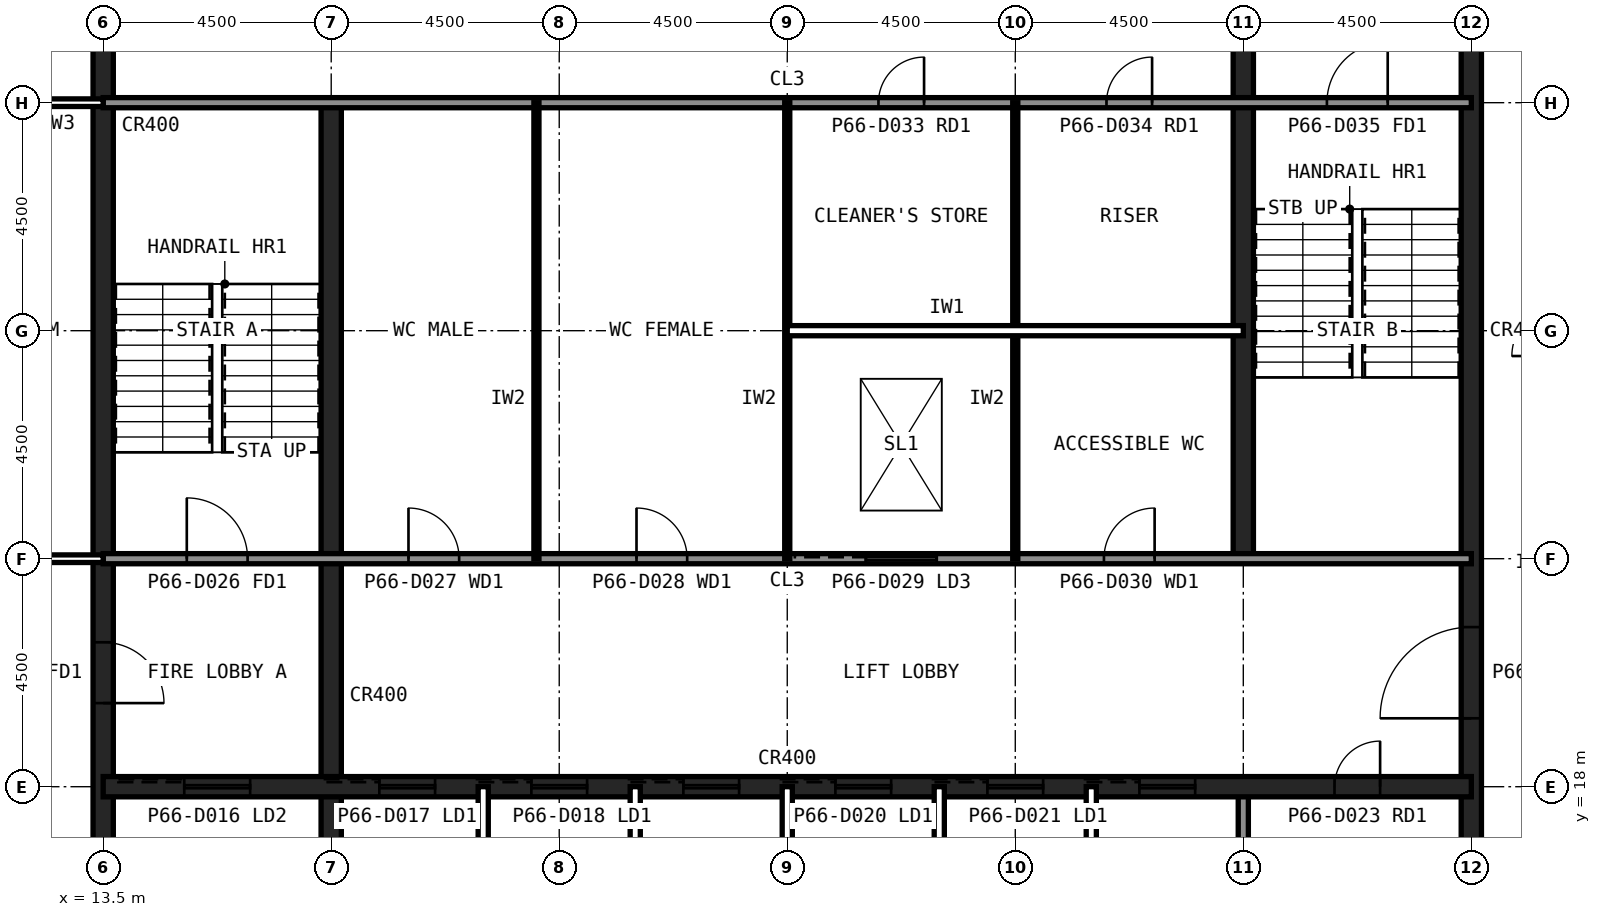
"""IFC4 building model, lengths in metres.
Left out: names, types, materials, properties, quantities, classifications, styles, units other than length and angle.
Written with IfcOpenShell. Run it as: python <this file> out.ifc"""

import sys

from ifc_helpers import new_model, si_unit, direction, frame, frame_2d, origin, place, context, subcontext, project, spatial, rectangle, extrude, element, fill, save


model = new_model("IFC4")
c1 = context("Model", 3, precision=1e-05, world=origin(), true_north=direction((0.0, 1.0)))
c2 = subcontext(c1, "Body", "Model", "MODEL_VIEW")
j1 = project(units=[si_unit("LENGTHUNIT", "METRE"), si_unit("PLANEANGLEUNIT", "RADIAN")], contexts=[c1])
p1 = place(None, origin())
s1 = spatial("IfcSite", under=j1, at=p1, CompositionType="ELEMENT")
p2 = place(p1, origin())
s2 = spatial("IfcBuilding", under=s1, at=p2, CompositionType="ELEMENT")
p3 = place(p2, frame((0.0, 0.0, 278.6)))
s3 = spatial("IfcBuildingStorey", under=s2, at=p3, CompositionType="ELEMENT", Elevation=278.6)
p4 = place(p3, frame((40.5, 13.5, 0.0), z_axis=(0.0, 0.0, 1.0), x_axis=(0.0, 1.0, 0.0)))
e1 = element("IfcWall", 1, at=p4, inside=s3, PredefinedType="SHEAR", context=c2, shape_type="SweptSolid", body=[
    extrude(rectangle(XDim=27.0, YDim=0.4, at=frame_2d((13.5, 0.0))), origin(), (0.0, 0.0, 1.0), 4.0),
])
p5 = place(p4, frame((5.85, 0.0, 0.0)))
e2 = element("IfcOpeningElement", 2, at=p5, cuts=e1, PredefinedType="OPENING", context=c2, shape_type="SweptSolid", body=[
    extrude(rectangle(XDim=1.8, YDim=2.1, at=frame_2d((0.9, 1.05))), frame((0.0, 0.21, 0.0), z_axis=(0.0, -1.0, 0.0), x_axis=(1.0, 0.0, 0.0)), (0.0, 0.0, 1.0), 0.42),
])
p6 = place(p4, frame((19.65, 0.0, 0.0)))
e3 = element("IfcOpeningElement", 3, at=p6, cuts=e1, PredefinedType="OPENING", context=c2, shape_type="SweptSolid", body=[
    extrude(rectangle(XDim=1.2, YDim=2.1, at=frame_2d((0.6, 1.05))), frame((0.0, 0.21, 0.0), z_axis=(0.0, -1.0, 0.0), x_axis=(1.0, 0.0, 0.0)), (0.0, 0.0, 1.0), 0.42),
])
p7 = place(p3, frame((13.5, 40.5, 0.0), z_axis=(0.0, 0.0, 1.0), x_axis=(0.0, -1.0, 0.0)))
e4 = element("IfcWall", 4, at=p7, inside=s3, PredefinedType="SHEAR", context=c2, shape_type="SweptSolid", body=[
    extrude(rectangle(XDim=27.0, YDim=0.4, at=frame_2d((13.5, 0.0))), origin(), (0.0, 0.0, 1.0), 4.0),
])
p8 = place(p7, frame((19.65, 0.0, 0.0)))
e5 = element("IfcOpeningElement", 5, at=p8, cuts=e4, PredefinedType="OPENING", context=c2, shape_type="SweptSolid", body=[
    extrude(rectangle(XDim=1.2, YDim=2.1, at=frame_2d((0.6, 1.05))), frame((0.0, 0.21, 0.0), z_axis=(0.0, -1.0, 0.0), x_axis=(1.0, 0.0, 0.0)), (0.0, 0.0, 1.0), 0.42),
])
p9 = place(p7, frame((5.85, 0.0, 0.0)))
e6 = element("IfcOpeningElement", 6, at=p9, cuts=e4, PredefinedType="OPENING", context=c2, shape_type="SweptSolid", body=[
    extrude(rectangle(XDim=1.8, YDim=2.1, at=frame_2d((0.9, 1.05))), frame((0.0, 0.21, 0.0), z_axis=(0.0, -1.0, 0.0), x_axis=(1.0, 0.0, 0.0)), (0.0, 0.0, 1.0), 0.42),
])
p10 = place(p3, frame((18.0, 13.5, 0.0), z_axis=(0.0, 0.0, 1.0), x_axis=(0.0, 1.0, 0.0)))
e7 = element("IfcWall", 7, at=p10, inside=s3, PredefinedType="SHEAR", context=c2, shape_type="SweptSolid", body=[
    extrude(rectangle(XDim=18.0, YDim=0.4, at=frame_2d((9.0, 0.0))), origin(), (0.0, 0.0, 1.0), 4.0),
])
p11 = place(p3, frame((36.0, 13.5, 0.0), z_axis=(0.0, 0.0, 1.0), x_axis=(0.0, 1.0, 0.0)))
e8 = element("IfcWall", 8, at=p11, inside=s3, PredefinedType="SOLIDWALL", context=c2, shape_type="SweptSolid", body=[
    extrude(rectangle(XDim=4.5, YDim=0.2, at=frame_2d((2.25, 0.0))), origin(), (0.0, 0.0, 1.0), 3.84),
])
p12 = place(p3, frame((36.0, 22.5, 0.0), z_axis=(0.0, 0.0, 1.0), x_axis=(0.0, 1.0, 0.0)))
e9 = element("IfcWall", 9, at=p12, inside=s3, PredefinedType="SHEAR", context=c2, shape_type="SweptSolid", body=[
    extrude(rectangle(XDim=18.0, YDim=0.4, at=frame_2d((9.0, 0.0))), origin(), (0.0, 0.0, 1.0), 4.0),
])
p13 = place(p3, frame((13.5, 18.0, 0.0), z_axis=(0.0, 0.0, 1.0), x_axis=(1.0, 0.0, 0.0)))
e10 = element("IfcWall", 10, at=p13, inside=s3, PredefinedType="SHEAR", context=c2, shape_type="SweptSolid", body=[
    extrude(rectangle(XDim=27.0, YDim=0.4, at=frame_2d((13.5, 0.0))), origin(), (0.0, 0.0, 1.0), 4.0),
])
p14 = place(p13, frame((24.3, 0.0, 0.0)))
e11 = element("IfcOpeningElement", 11, at=p14, cuts=e10, PredefinedType="OPENING", context=c2, shape_type="SweptSolid", body=[
    extrude(rectangle(XDim=0.9, YDim=2.1, at=frame_2d((0.45, 1.05))), frame((0.0, 0.21, 0.0), z_axis=(0.0, -1.0, 0.0), x_axis=(1.0, 0.0, 0.0)), (0.0, 0.0, 1.0), 0.42),
])
p15 = place(p13, frame((5.45, 0.0, 0.0)))
e12 = element("IfcOpeningElement", 12, at=p15, cuts=e10, PredefinedType="OPENING", context=c2, shape_type="SweptSolid", body=[
    extrude(rectangle(XDim=1.1, YDim=2.1, at=frame_2d((0.55, 1.05))), frame((0.0, 0.21, 0.0), z_axis=(0.0, -1.0, 0.0), x_axis=(1.0, 0.0, 0.0)), (0.0, 0.0, 1.0), 0.42),
])
p16 = place(p13, frame((8.45, 0.0, 0.0)))
e13 = element("IfcOpeningElement", 13, at=p16, cuts=e10, PredefinedType="OPENING", context=c2, shape_type="SweptSolid", body=[
    extrude(rectangle(XDim=1.1, YDim=2.1, at=frame_2d((0.55, 1.05))), frame((0.0, 0.21, 0.0), z_axis=(0.0, -1.0, 0.0), x_axis=(1.0, 0.0, 0.0)), (0.0, 0.0, 1.0), 0.42),
])
p17 = place(p13, frame((11.45, 0.0, 0.0)))
e14 = element("IfcOpeningElement", 14, at=p17, cuts=e10, PredefinedType="OPENING", context=c2, shape_type="SweptSolid", body=[
    extrude(rectangle(XDim=1.1, YDim=2.1, at=frame_2d((0.55, 1.05))), frame((0.0, 0.21, 0.0), z_axis=(0.0, -1.0, 0.0), x_axis=(1.0, 0.0, 0.0)), (0.0, 0.0, 1.0), 0.42),
])
p18 = place(p13, frame((14.45, 0.0, 0.0)))
e15 = element("IfcOpeningElement", 15, at=p18, cuts=e10, PredefinedType="OPENING", context=c2, shape_type="SweptSolid", body=[
    extrude(rectangle(XDim=1.1, YDim=2.1, at=frame_2d((0.55, 1.05))), frame((0.0, 0.21, 0.0), z_axis=(0.0, -1.0, 0.0), x_axis=(1.0, 0.0, 0.0)), (0.0, 0.0, 1.0), 0.42),
])
p19 = place(p13, frame((17.45, 0.0, 0.0)))
e16 = element("IfcOpeningElement", 16, at=p19, cuts=e10, PredefinedType="OPENING", context=c2, shape_type="SweptSolid", body=[
    extrude(rectangle(XDim=1.1, YDim=2.1, at=frame_2d((0.55, 1.05))), frame((0.0, 0.21, 0.0), z_axis=(0.0, -1.0, 0.0), x_axis=(1.0, 0.0, 0.0)), (0.0, 0.0, 1.0), 0.42),
])
p20 = place(p13, frame((20.45, 0.0, 0.0)))
e17 = element("IfcOpeningElement", 17, at=p20, cuts=e10, PredefinedType="OPENING", context=c2, shape_type="SweptSolid", body=[
    extrude(rectangle(XDim=1.1, YDim=2.1, at=frame_2d((0.55, 1.05))), frame((0.0, 0.21, 0.0), z_axis=(0.0, -1.0, 0.0), x_axis=(1.0, 0.0, 0.0)), (0.0, 0.0, 1.0), 0.42),
])
p21 = place(p13, frame((1.6, 0.0, 0.0)))
e18 = element("IfcOpeningElement", 18, at=p21, cuts=e10, PredefinedType="OPENING", context=c2, shape_type="SweptSolid", body=[
    extrude(rectangle(XDim=1.3, YDim=2.2, at=frame_2d((0.65, 1.1))), frame((0.0, 0.21, 0.0), z_axis=(0.0, -1.0, 0.0), x_axis=(1.0, 0.0, 0.0)), (0.0, 0.0, 1.0), 0.42),
])
p22 = place(p3, frame((13.5, 22.5, 0.0), z_axis=(0.0, 0.0, 1.0), x_axis=(1.0, 0.0, 0.0)))
e19 = element("IfcWall", 19, at=p22, inside=s3, PredefinedType="SOLIDWALL", context=c2, shape_type="SweptSolid", body=[
    extrude(rectangle(XDim=27.0, YDim=0.2, at=frame_2d((13.5, 0.0))), origin(), (0.0, 0.0, 1.0), 3.84),
])
p23 = place(p22, frame((1.65, 0.0, 0.0)))
e20 = element("IfcOpeningElement", 20, at=p23, cuts=e19, PredefinedType="OPENING", context=c2, shape_type="SweptSolid", body=[
    extrude(rectangle(XDim=1.2, YDim=2.1, at=frame_2d((0.6, 1.05))), frame((0.0, 0.11, 0.0), z_axis=(0.0, -1.0, 0.0), x_axis=(1.0, 0.0, 0.0)), (0.0, 0.0, 1.0), 0.22),
])
p24 = place(p22, frame((6.025, 0.0, 0.0)))
e21 = element("IfcOpeningElement", 21, at=p24, cuts=e19, PredefinedType="OPENING", context=c2, shape_type="SweptSolid", body=[
    extrude(rectangle(XDim=1.0, YDim=2.1, at=frame_2d((0.5, 1.05))), frame((0.0, 0.11, 0.0), z_axis=(0.0, -1.0, 0.0), x_axis=(1.0, 0.0, 0.0)), (0.0, 0.0, 1.0), 0.22),
])
p25 = place(p22, frame((10.525, 0.0, 0.0)))
e22 = element("IfcOpeningElement", 22, at=p25, cuts=e19, PredefinedType="OPENING", context=c2, shape_type="SweptSolid", body=[
    extrude(rectangle(XDim=1.0, YDim=2.1, at=frame_2d((0.5, 1.05))), frame((0.0, 0.11, 0.0), z_axis=(0.0, -1.0, 0.0), x_axis=(1.0, 0.0, 0.0)), (0.0, 0.0, 1.0), 0.22),
])
p26 = place(p22, frame((19.75, 0.0, 0.0)))
e23 = element("IfcOpeningElement", 23, at=p26, cuts=e19, PredefinedType="OPENING", context=c2, shape_type="SweptSolid", body=[
    extrude(rectangle(XDim=1.0, YDim=2.1, at=frame_2d((0.5, 1.05))), frame((0.0, 0.11, 0.0), z_axis=(0.0, -1.0, 0.0), x_axis=(1.0, 0.0, 0.0)), (0.0, 0.0, 1.0), 0.22),
])
p27 = place(p22, frame((15.05, 0.0, 0.0)))
e24 = element("IfcOpeningElement", 24, at=p27, cuts=e19, PredefinedType="OPENING", context=c2, shape_type="SweptSolid", body=[
    extrude(rectangle(XDim=1.4, YDim=2.4, at=frame_2d((0.7, 1.2))), frame((0.0, 0.11, 0.0), z_axis=(0.0, -1.0, 0.0), x_axis=(1.0, 0.0, 0.0)), (0.0, 0.0, 1.0), 0.22),
])
p28 = place(p3, frame((13.5, 31.5, 0.0), z_axis=(0.0, 0.0, 1.0), x_axis=(1.0, 0.0, 0.0)))
e25 = element("IfcWall", 25, at=p28, inside=s3, PredefinedType="SOLIDWALL", context=c2, shape_type="SweptSolid", body=[
    extrude(rectangle(XDim=27.0, YDim=0.2, at=frame_2d((13.5, 0.0))), origin(), (0.0, 0.0, 1.0), 3.84),
])
p29 = place(p28, frame((24.15, 0.0, 0.0)))
e26 = element("IfcOpeningElement", 26, at=p29, cuts=e25, PredefinedType="OPENING", context=c2, shape_type="SweptSolid", body=[
    extrude(rectangle(XDim=1.2, YDim=2.1, at=frame_2d((0.6, 1.05))), frame((0.0, 0.11, 0.0), z_axis=(0.0, -1.0, 0.0), x_axis=(1.0, 0.0, 0.0)), (0.0, 0.0, 1.0), 0.22),
])
p30 = place(p28, frame((15.3, 0.0, 0.0)))
e27 = element("IfcOpeningElement", 27, at=p30, cuts=e25, PredefinedType="OPENING", context=c2, shape_type="SweptSolid", body=[
    extrude(rectangle(XDim=0.9, YDim=2.1, at=frame_2d((0.45, 1.05))), frame((0.0, 0.11, 0.0), z_axis=(0.0, -1.0, 0.0), x_axis=(1.0, 0.0, 0.0)), (0.0, 0.0, 1.0), 0.22),
])
p31 = place(p28, frame((19.8, 0.0, 0.0)))
e28 = element("IfcOpeningElement", 28, at=p31, cuts=e25, PredefinedType="OPENING", context=c2, shape_type="SweptSolid", body=[
    extrude(rectangle(XDim=0.9, YDim=2.1, at=frame_2d((0.45, 1.05))), frame((0.0, 0.11, 0.0), z_axis=(0.0, -1.0, 0.0), x_axis=(1.0, 0.0, 0.0)), (0.0, 0.0, 1.0), 0.22),
])
for number, where, z_axis, x_axis in (
    (29, (21.0, 13.5, 0.0), (0.0, 0.0, 1.0), (0.0, 1.0, 0.0)),
    (30, (24.0, 13.5, 0.0), (0.0, 0.0, 1.0), (0.0, 1.0, 0.0)),
    (31, (27.0, 13.5, 0.0), (0.0, 0.0, 1.0), (0.0, 1.0, 0.0)),
    (32, (30.0, 13.5, 0.0), (0.0, 0.0, 1.0), (0.0, 1.0, 0.0)),
    (33, (33.0, 13.5, 0.0), (0.0, 0.0, 1.0), (0.0, 1.0, 0.0)),
):
    element("IfcWall", number, at=place(p3, frame(where, z_axis=z_axis, x_axis=x_axis)), inside=s3, PredefinedType="PARTITIONING", context=c2, shape_type="SweptSolid", body=[
        extrude(rectangle(XDim=4.5, YDim=0.2, at=frame_2d((2.25, 0.0))), origin(), (0.0, 0.0, 1.0), 3.84),
    ])
for number, where, z_axis, x_axis in (
    (34, (22.05, 22.5, 0.0), (0.0, 0.0, 1.0), (0.0, 1.0, 0.0)),
    (35, (27.0, 22.5, 0.0), (0.0, 0.0, 1.0), (0.0, 1.0, 0.0)),
    (36, (31.5, 22.5, 0.0), (0.0, 0.0, 1.0), (0.0, 1.0, 0.0)),
):
    element("IfcWall", number, at=place(p3, frame(where, z_axis=z_axis, x_axis=x_axis)), inside=s3, PredefinedType="PLUMBINGWALL", context=c2, shape_type="SweptSolid", body=[
        extrude(rectangle(XDim=9.0, YDim=0.1, at=frame_2d((4.5, 0.0))), origin(), (0.0, 0.0, 1.0), 3.84),
    ])
p32 = place(p3, frame((27.0, 27.0, 0.0), z_axis=(0.0, 0.0, 1.0), x_axis=(1.0, 0.0, 0.0)))
e37 = element("IfcWall", 37, at=p32, inside=s3, PredefinedType="PARTITIONING", context=c2, shape_type="SweptSolid", body=[
    extrude(rectangle(XDim=9.0, YDim=0.2, at=frame_2d((4.5, 0.0))), origin(), (0.0, 0.0, 1.0), 3.84),
])
p33 = place(p3, frame((9.0, 22.5, 0.0), z_axis=(0.0, 0.0, 1.0), x_axis=(1.0, 0.0, 0.0)))
e38 = element("IfcWall", 38, at=p33, inside=s3, PredefinedType="PARTITIONING", context=c2, shape_type="SweptSolid", body=[
    extrude(rectangle(XDim=4.5, YDim=0.15, at=frame_2d((2.25, 0.0))), origin(), (0.0, 0.0, 1.0), 2.989),
])
p34 = place(p3, frame((13.5, 31.5, 0.0), z_axis=(0.0, 0.0, 1.0), x_axis=(-1.0, 0.0, 0.0)))
e39 = element("IfcWall", 39, at=p34, inside=s3, PredefinedType="PARTITIONING", context=c2, shape_type="SweptSolid", body=[
    extrude(rectangle(XDim=4.5, YDim=0.15, at=frame_2d((2.25, 0.0))), origin(), (0.0, 0.0, 1.0), 2.989),
])
p35 = place(p34, frame((1.75, 0.0, 0.0)))
e40 = element("IfcOpeningElement", 40, at=p35, cuts=e39, PredefinedType="OPENING", context=c2, shape_type="SweptSolid", body=[
    extrude(rectangle(XDim=1.0, YDim=2.1, at=frame_2d((0.5, 1.05))), frame((0.0, 0.085, 0.0), z_axis=(0.0, -1.0, 0.0), x_axis=(1.0, 0.0, 0.0)), (0.0, 0.0, 1.0), 0.17),
])
p36 = place(p8, origin())
e41 = element("IfcDoor", 41, at=p36, inside=s3, OperationType="SINGLE_SWING_RIGHT", PredefinedType="DOOR", context=c2, shape_type="SweptSolid", body=[
    extrude(rectangle(XDim=1.2, YDim=2.1, at=frame_2d((0.6, 1.05))), frame((0.0, 0.025, 0.0), z_axis=(0.0, -1.0, 0.0), x_axis=(1.0, 0.0, 0.0)), (0.0, 0.0, 1.0), 0.05),
])
fill(e5, e41)
p37 = place(p5, origin())
e42 = element("IfcDoor", 42, at=p37, inside=s3, OperationType="SINGLE_SWING_LEFT", PredefinedType="DOOR", context=c2, shape_type="SweptSolid", body=[
    extrude(rectangle(XDim=1.8, YDim=2.1, at=frame_2d((0.9, 1.05))), frame((0.0, 0.025, 0.0), z_axis=(0.0, -1.0, 0.0), x_axis=(1.0, 0.0, 0.0)), (0.0, 0.0, 1.0), 0.05),
])
fill(e2, e42)
p38 = place(p23, origin())
e43 = element("IfcDoor", 43, at=p38, inside=s3, OperationType="SINGLE_SWING_LEFT", PredefinedType="DOOR", context=c2, shape_type="SweptSolid", body=[
    extrude(rectangle(XDim=1.2, YDim=2.1, at=frame_2d((0.6, 1.05))), frame((0.0, 0.025, 0.0), z_axis=(0.0, -1.0, 0.0), x_axis=(1.0, 0.0, 0.0)), (0.0, 0.0, 1.0), 0.05),
])
fill(e20, e43)
p39 = place(p29, origin())
e44 = element("IfcDoor", 44, at=p39, inside=s3, OperationType="SINGLE_SWING_RIGHT", PredefinedType="DOOR", context=c2, shape_type="SweptSolid", body=[
    extrude(rectangle(XDim=1.2, YDim=2.1, at=frame_2d((0.6, 1.05))), frame((0.0, 0.025, 0.0), z_axis=(0.0, -1.0, 0.0), x_axis=(1.0, 0.0, 0.0)), (0.0, 0.0, 1.0), 0.05),
])
fill(e26, e44)
p40 = place(p24, origin())
e45 = element("IfcDoor", 45, at=p40, inside=s3, OperationType="SINGLE_SWING_LEFT", PredefinedType="DOOR", context=c2, shape_type="SweptSolid", body=[
    extrude(rectangle(XDim=1.0, YDim=2.1, at=frame_2d((0.5, 1.05))), frame((0.0, 0.025, 0.0), z_axis=(0.0, -1.0, 0.0), x_axis=(1.0, 0.0, 0.0)), (0.0, 0.0, 1.0), 0.05),
])
fill(e21, e45)
p41 = place(p25, origin())
e46 = element("IfcDoor", 46, at=p41, inside=s3, OperationType="SINGLE_SWING_LEFT", PredefinedType="DOOR", context=c2, shape_type="SweptSolid", body=[
    extrude(rectangle(XDim=1.0, YDim=2.1, at=frame_2d((0.5, 1.05))), frame((0.0, 0.025, 0.0), z_axis=(0.0, -1.0, 0.0), x_axis=(1.0, 0.0, 0.0)), (0.0, 0.0, 1.0), 0.05),
])
fill(e22, e46)
p42 = place(p26, origin())
e47 = element("IfcDoor", 47, at=p42, inside=s3, OperationType="SINGLE_SWING_RIGHT", PredefinedType="DOOR", context=c2, shape_type="SweptSolid", body=[
    extrude(rectangle(XDim=1.0, YDim=2.1, at=frame_2d((0.5, 1.05))), frame((0.0, 0.025, 0.0), z_axis=(0.0, -1.0, 0.0), x_axis=(1.0, 0.0, 0.0)), (0.0, 0.0, 1.0), 0.05),
])
fill(e23, e47)
p43 = place(p30, origin())
e48 = element("IfcDoor", 48, at=p43, inside=s3, OperationType="SINGLE_SWING_RIGHT", PredefinedType="DOOR", context=c2, shape_type="SweptSolid", body=[
    extrude(rectangle(XDim=0.9, YDim=2.1, at=frame_2d((0.45, 1.05))), frame((0.0, 0.025, 0.0), z_axis=(0.0, -1.0, 0.0), x_axis=(1.0, 0.0, 0.0)), (0.0, 0.0, 1.0), 0.05),
])
fill(e27, e48)
p44 = place(p31, origin())
e49 = element("IfcDoor", 49, at=p44, inside=s3, OperationType="SINGLE_SWING_RIGHT", PredefinedType="DOOR", context=c2, shape_type="SweptSolid", body=[
    extrude(rectangle(XDim=0.9, YDim=2.1, at=frame_2d((0.45, 1.05))), frame((0.0, 0.025, 0.0), z_axis=(0.0, -1.0, 0.0), x_axis=(1.0, 0.0, 0.0)), (0.0, 0.0, 1.0), 0.05),
])
fill(e28, e49)
p45 = place(p14, origin())
e50 = element("IfcDoor", 50, at=p45, inside=s3, OperationType="SINGLE_SWING_RIGHT", PredefinedType="DOOR", context=c2, shape_type="SweptSolid", body=[
    extrude(rectangle(XDim=0.9, YDim=2.1, at=frame_2d((0.45, 1.05))), frame((0.0, 0.025, 0.0), z_axis=(0.0, -1.0, 0.0), x_axis=(1.0, 0.0, 0.0)), (0.0, 0.0, 1.0), 0.05),
])
fill(e11, e50)
p46 = place(p15, origin())
e51 = element("IfcDoor", 51, at=p46, inside=s3, OperationType="SLIDING_TO_LEFT", PredefinedType="DOOR", context=c2, shape_type="SweptSolid", body=[
    extrude(rectangle(XDim=1.1, YDim=2.1, at=frame_2d((0.55, 1.05))), frame((0.0, 0.025, 0.0), z_axis=(0.0, -1.0, 0.0), x_axis=(1.0, 0.0, 0.0)), (0.0, 0.0, 1.0), 0.05),
])
fill(e12, e51)
p47 = place(p16, origin())
e52 = element("IfcDoor", 52, at=p47, inside=s3, OperationType="SLIDING_TO_LEFT", PredefinedType="DOOR", context=c2, shape_type="SweptSolid", body=[
    extrude(rectangle(XDim=1.1, YDim=2.1, at=frame_2d((0.55, 1.05))), frame((0.0, 0.025, 0.0), z_axis=(0.0, -1.0, 0.0), x_axis=(1.0, 0.0, 0.0)), (0.0, 0.0, 1.0), 0.05),
])
fill(e13, e52)
p48 = place(p17, origin())
e53 = element("IfcDoor", 53, at=p48, inside=s3, OperationType="SLIDING_TO_LEFT", PredefinedType="DOOR", context=c2, shape_type="SweptSolid", body=[
    extrude(rectangle(XDim=1.1, YDim=2.1, at=frame_2d((0.55, 1.05))), frame((0.0, 0.025, 0.0), z_axis=(0.0, -1.0, 0.0), x_axis=(1.0, 0.0, 0.0)), (0.0, 0.0, 1.0), 0.05),
])
fill(e14, e53)
p49 = place(p18, origin())
e54 = element("IfcDoor", 54, at=p49, inside=s3, OperationType="SLIDING_TO_LEFT", PredefinedType="DOOR", context=c2, shape_type="SweptSolid", body=[
    extrude(rectangle(XDim=1.1, YDim=2.1, at=frame_2d((0.55, 1.05))), frame((0.0, 0.025, 0.0), z_axis=(0.0, -1.0, 0.0), x_axis=(1.0, 0.0, 0.0)), (0.0, 0.0, 1.0), 0.05),
])
fill(e15, e54)
p50 = place(p19, origin())
e55 = element("IfcDoor", 55, at=p50, inside=s3, OperationType="SLIDING_TO_LEFT", PredefinedType="DOOR", context=c2, shape_type="SweptSolid", body=[
    extrude(rectangle(XDim=1.1, YDim=2.1, at=frame_2d((0.55, 1.05))), frame((0.0, 0.025, 0.0), z_axis=(0.0, -1.0, 0.0), x_axis=(1.0, 0.0, 0.0)), (0.0, 0.0, 1.0), 0.05),
])
fill(e16, e55)
p51 = place(p20, origin())
e56 = element("IfcDoor", 56, at=p51, inside=s3, OperationType="SLIDING_TO_LEFT", PredefinedType="DOOR", context=c2, shape_type="SweptSolid", body=[
    extrude(rectangle(XDim=1.1, YDim=2.1, at=frame_2d((0.55, 1.05))), frame((0.0, 0.025, 0.0), z_axis=(0.0, -1.0, 0.0), x_axis=(1.0, 0.0, 0.0)), (0.0, 0.0, 1.0), 0.05),
])
fill(e17, e56)
p52 = place(p21, origin())
e57 = element("IfcDoor", 57, at=p52, inside=s3, OperationType="SLIDING_TO_LEFT", PredefinedType="DOOR", context=c2, shape_type="SweptSolid", body=[
    extrude(rectangle(XDim=1.3, YDim=2.2, at=frame_2d((0.65, 1.1))), frame((0.0, 0.025, 0.0), z_axis=(0.0, -1.0, 0.0), x_axis=(1.0, 0.0, 0.0)), (0.0, 0.0, 1.0), 0.05),
])
fill(e18, e57)
p53 = place(p27, origin())
e58 = element("IfcDoor", 58, at=p53, inside=s3, OperationType="SLIDING_TO_LEFT", PredefinedType="DOOR", context=c2, shape_type="SweptSolid", body=[
    extrude(rectangle(XDim=1.4, YDim=2.4, at=frame_2d((0.7, 1.2))), frame((0.0, 0.025, 0.0), z_axis=(0.0, -1.0, 0.0), x_axis=(1.0, 0.0, 0.0)), (0.0, 0.0, 1.0), 0.05),
])
fill(e24, e58)
save(model, sys.argv[1])
